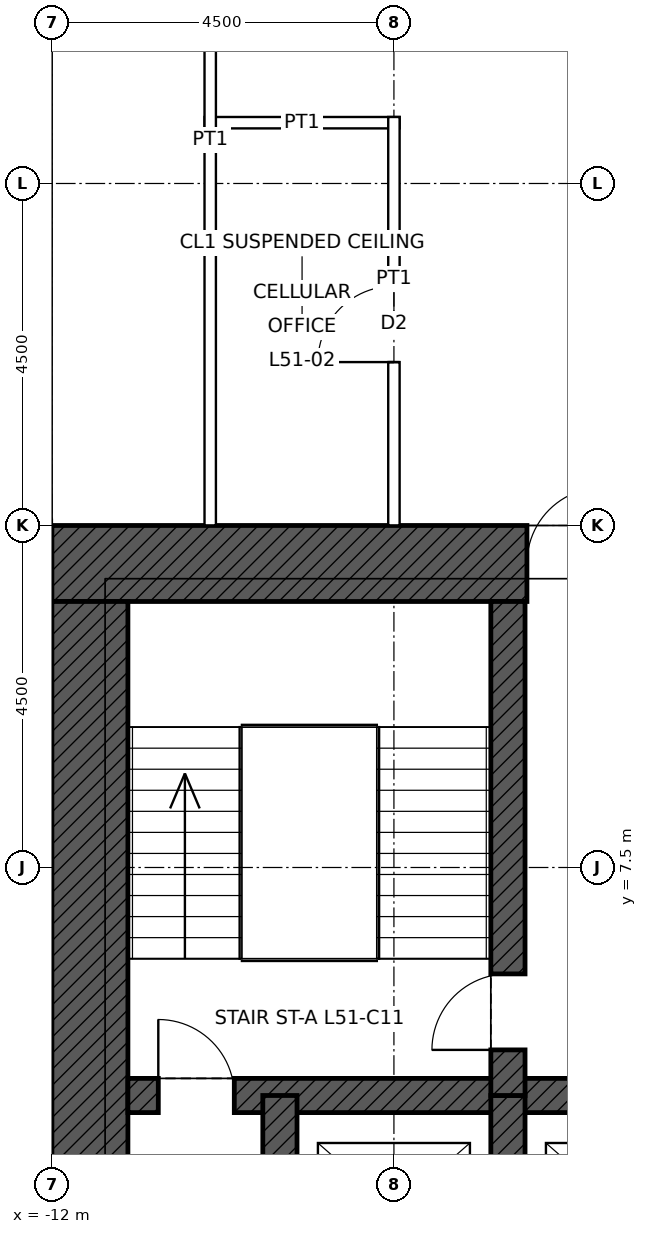
"""IFC4 building model, lengths in metres.
Left out: names, types, materials, properties, quantities, classifications, styles, units other than length and angle.
Written with IfcOpenShell. Run it as: python <this file> out.ifc"""

import sys

from ifc_helpers import new_model, si_unit, direction, frame, frame_2d, origin, place, context, subcontext, project, spatial, rectangle, extrude, element, fill, save


model = new_model("IFC4")
c1 = context("Model", 3, precision=1e-05, world=origin(), true_north=direction((0.0, 1.0)))
c2 = subcontext(c1, "Body", "Model", "MODEL_VIEW")
j1 = project(units=[si_unit("LENGTHUNIT", "METRE"), si_unit("PLANEANGLEUNIT", "RADIAN")], contexts=[c1])
p1 = place(None, origin())
s1 = spatial("IfcSite", under=j1, at=p1, CompositionType="ELEMENT")
p2 = place(p1, origin())
s2 = spatial("IfcBuilding", under=s1, at=p2, CompositionType="ELEMENT")
p3 = place(p2, frame((0.0, 0.0, 237.9)))
s3 = spatial("IfcBuildingStorey", under=s2, at=p3, CompositionType="ELEMENT", Elevation=237.9)
p4 = place(p3, frame((-12.0, 11.5, 0.0), z_axis=(0.0, 0.0, 1.0), x_axis=(1.0, 0.0, 0.0)))
e1 = element("IfcWall", 1, at=p4, inside=s3, PredefinedType="SHEAR", context=c2, shape_type="SweptSolid", body=[
    extrude(rectangle(XDim=24.0, YDim=1.0, at=frame_2d((12.0, 0.0))), origin(), (0.0, 0.0, 1.0), 4.0),
])
p5 = place(p4, frame((6.25, 0.0, 0.0)))
e2 = element("IfcOpeningElement", 2, at=p5, cuts=e1, PredefinedType="OPENING", context=c2, shape_type="SweptSolid", body=[
    extrude(rectangle(XDim=1.0, YDim=2.4, at=frame_2d((0.5, 1.2))), frame((0.0, 0.51, 0.0), z_axis=(0.0, -1.0, 0.0), x_axis=(1.0, 0.0, 0.0)), (0.0, 0.0, 1.0), 1.02),
])
p6 = place(p4, frame((16.75, 0.0, 0.0)))
e3 = element("IfcOpeningElement", 3, at=p6, cuts=e1, PredefinedType="OPENING", context=c2, shape_type="SweptSolid", body=[
    extrude(rectangle(XDim=1.0, YDim=2.4, at=frame_2d((0.5, 1.2))), frame((0.0, 0.51, 0.0), z_axis=(0.0, -1.0, 0.0), x_axis=(1.0, 0.0, 0.0)), (0.0, 0.0, 1.0), 1.02),
])
p7 = place(p3, frame((-11.5, -11.0, 0.0), z_axis=(0.0, 0.0, 1.0), x_axis=(0.0, 1.0, 0.0)))
e4 = element("IfcWall", 4, at=p7, inside=s3, PredefinedType="SHEAR", context=c2, shape_type="SweptSolid", body=[
    extrude(rectangle(XDim=22.0, YDim=1.0, at=frame_2d((11.0, 0.0))), origin(), (0.0, 0.0, 1.0), 4.0),
])
p8 = place(p7, frame((10.5, 0.0, 0.0)))
e5 = element("IfcOpeningElement", 5, at=p8, cuts=e4, PredefinedType="OPENING", context=c2, shape_type="SweptSolid", body=[
    extrude(rectangle(XDim=1.0, YDim=2.4, at=frame_2d((0.5, 1.2))), frame((0.0, 0.51, 0.0), z_axis=(0.0, -1.0, 0.0), x_axis=(1.0, 0.0, 0.0)), (0.0, 0.0, 1.0), 1.02),
])
p9 = place(p3, frame((-11.0, 4.5, 0.0), z_axis=(0.0, 0.0, 1.0), x_axis=(1.0, 0.0, 0.0)))
e6 = element("IfcWall", 6, at=p9, inside=s3, PredefinedType="SHEAR", context=c2, shape_type="SweptSolid", body=[
    extrude(rectangle(XDim=22.0, YDim=0.45, at=frame_2d((11.0, 0.0))), origin(), (0.0, 0.0, 1.0), 4.0),
])
p10 = place(p9, frame((0.4, 0.0, 0.0)))
e7 = element("IfcOpeningElement", 7, at=p10, cuts=e6, PredefinedType="OPENING", context=c2, shape_type="SweptSolid", body=[
    extrude(rectangle(XDim=1.0, YDim=2.1, at=frame_2d((0.5, 1.05))), frame((0.0, 0.235, 0.0), z_axis=(0.0, -1.0, 0.0), x_axis=(1.0, 0.0, 0.0)), (0.0, 0.0, 1.0), 0.47),
])
p11 = place(p9, frame((20.6, 0.0, 0.0)))
e8 = element("IfcOpeningElement", 8, at=p11, cuts=e6, PredefinedType="OPENING", context=c2, shape_type="SweptSolid", body=[
    extrude(rectangle(XDim=1.0, YDim=2.1, at=frame_2d((0.5, 1.05))), frame((0.0, 0.235, 0.0), z_axis=(0.0, -1.0, 0.0), x_axis=(1.0, 0.0, 0.0)), (0.0, 0.0, 1.0), 0.47),
])
for number, where, z_axis, x_axis in (
    (9, (-9.0, 1.5, 0.0), (0.0, 0.0, 1.0), (0.0, 1.0, 0.0)),
    (10, (-6.0, 1.5, 0.0), (0.0, 0.0, 1.0), (0.0, 1.0, 0.0)),
):
    element("IfcWall", number, at=place(p3, frame(where, z_axis=z_axis, x_axis=x_axis)), inside=s3, PredefinedType="SHEAR", context=c2, shape_type="SweptSolid", body=[
        extrude(rectangle(XDim=3.0, YDim=0.45, at=frame_2d((1.5, 0.0))), origin(), (0.0, 0.0, 1.0), 4.0),
    ])
p12 = place(p3, frame((-6.0, 4.5, 0.0), z_axis=(0.0, 0.0, 1.0), x_axis=(0.0, 1.0, 0.0)))
e11 = element("IfcWall", 11, at=p12, inside=s3, PredefinedType="SHEAR", context=c2, shape_type="SweptSolid", body=[
    extrude(rectangle(XDim=6.5, YDim=0.45, at=frame_2d((3.25, 0.0))), origin(), (0.0, 0.0, 1.0), 4.0),
])
p13 = place(p12, frame((0.6, 0.0, 0.0)))
e12 = element("IfcOpeningElement", 12, at=p13, cuts=e11, PredefinedType="OPENING", context=c2, shape_type="SweptSolid", body=[
    extrude(rectangle(XDim=1.0, YDim=2.1, at=frame_2d((0.5, 1.05))), frame((0.0, 0.235, 0.0), z_axis=(0.0, -1.0, 0.0), x_axis=(1.0, 0.0, 0.0)), (0.0, 0.0, 1.0), 0.47),
])
p14 = place(p3, frame((-9.992, 17.3, 0.0), z_axis=(0.0, 0.0, 1.0), x_axis=(1.0, 0.0, 0.0)))
e13 = element("IfcWall", 13, at=p14, inside=s3, PredefinedType="PARTITIONING", context=c2, shape_type="SweptSolid", body=[
    extrude(rectangle(XDim=2.567, YDim=0.15, at=frame_2d((1.283, 0.0))), origin(), (0.0, 0.0, 1.0), 3.85),
])
p15 = place(p3, frame((-9.917, 12.0, 0.0), z_axis=(0.0, 0.0, 1.0), x_axis=(0.0, 1.0, 0.0)))
e14 = element("IfcWall", 14, at=p15, inside=s3, PredefinedType="PARTITIONING", context=c2, shape_type="SweptSolid", body=[
    extrude(rectangle(XDim=10.15, YDim=0.15, at=frame_2d((5.075, 0.0))), origin(), (0.0, 0.0, 1.0), 3.85),
])
p16 = place(p3, frame((-7.5, 12.0, 0.0), z_axis=(0.0, 0.0, 1.0), x_axis=(0.0, 1.0, 0.0)))
e15 = element("IfcWall", 15, at=p16, inside=s3, PredefinedType="PARTITIONING", context=c2, shape_type="SweptSolid", body=[
    extrude(rectangle(XDim=5.375, YDim=0.15, at=frame_2d((2.688, 0.0))), origin(), (0.0, 0.0, 1.0), 3.238),
])
p17 = place(p16, frame((2.15, 0.0, 0.0)))
e16 = element("IfcOpeningElement", 16, at=p17, cuts=e15, PredefinedType="OPENING", context=c2, shape_type="SweptSolid", body=[
    extrude(rectangle(XDim=1.0, YDim=2.1, at=frame_2d((0.5, 1.05))), frame((0.0, 0.085, 0.0), z_axis=(0.0, -1.0, 0.0), x_axis=(1.0, 0.0, 0.0)), (0.0, 0.0, 1.0), 0.17),
])
p18 = place(p10, origin())
e17 = element("IfcDoor", 17, at=p18, inside=s3, OperationType="SINGLE_SWING_LEFT", PredefinedType="DOOR", context=c2, shape_type="SweptSolid", body=[
    extrude(rectangle(XDim=1.0, YDim=2.1, at=frame_2d((0.5, 1.05))), frame((0.0, 0.025, 0.0), z_axis=(0.0, -1.0, 0.0), x_axis=(1.0, 0.0, 0.0)), (0.0, 0.0, 1.0), 0.05),
])
fill(e7, e17)
p19 = place(p13, origin())
e18 = element("IfcDoor", 18, at=p19, inside=s3, OperationType="SINGLE_SWING_LEFT", PredefinedType="DOOR", context=c2, shape_type="SweptSolid", body=[
    extrude(rectangle(XDim=1.0, YDim=2.1, at=frame_2d((0.5, 1.05))), frame((0.0, 0.025, 0.0), z_axis=(0.0, -1.0, 0.0), x_axis=(1.0, 0.0, 0.0)), (0.0, 0.0, 1.0), 0.05),
])
fill(e12, e18)
p20 = place(p5, origin())
e19 = element("IfcDoor", 19, at=p20, inside=s3, OperationType="SINGLE_SWING_RIGHT", PredefinedType="DOOR", context=c2, shape_type="SweptSolid", body=[
    extrude(rectangle(XDim=1.0, YDim=2.4, at=frame_2d((0.5, 1.2))), frame((0.0, 0.485, 0.0), z_axis=(0.0, -1.0, 0.0), x_axis=(1.0, 0.0, 0.0)), (0.0, 0.0, 1.0), 0.05),
])
fill(e2, e19)
p21 = place(p17, origin())
e20 = element("IfcDoor", 20, at=p21, inside=s3, OperationType="SINGLE_SWING_LEFT", PredefinedType="DOOR", context=c2, shape_type="SweptSolid", body=[
    extrude(rectangle(XDim=1.0, YDim=2.1, at=frame_2d((0.5, 1.05))), frame((0.0, 0.025, 0.0), z_axis=(0.0, -1.0, 0.0), x_axis=(1.0, 0.0, 0.0)), (0.0, 0.0, 1.0), 0.05),
])
fill(e16, e20)
save(model, sys.argv[1])
